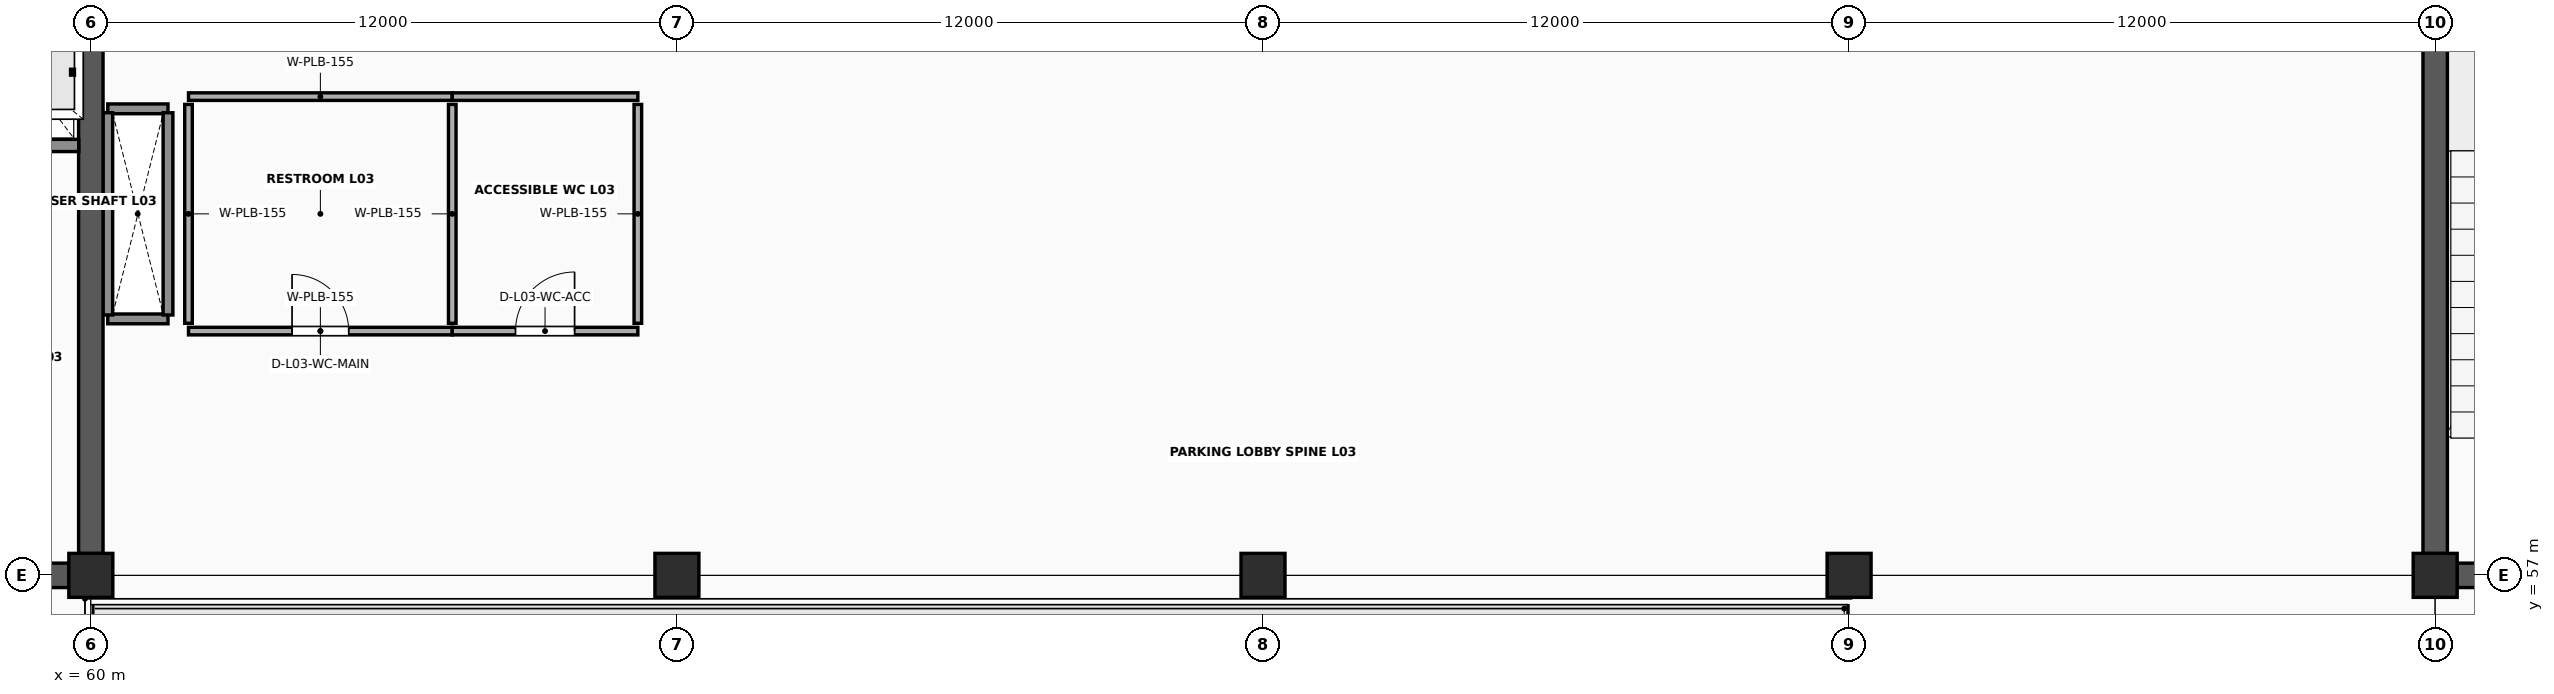
"""IFC4 building model, lengths in metres.
Left out: names, types, materials, properties, quantities, classifications, styles, units other than length and angle.
Written with IfcOpenShell. Run it as: python <this file> out.ifc"""

import sys

from ifc_helpers import new_model, si_unit, direction, frame, frame_2d, origin, origin_2d, place, context, subcontext, project, spatial, rectangle, extrude, element, fill, save


model = new_model("IFC4")
c1 = context("Model", 3, precision=1e-05, world=origin(), true_north=direction((0.0, 1.0)))
c2 = subcontext(c1, "Body", "Model", "MODEL_VIEW")
j1 = project(units=[si_unit("LENGTHUNIT", "METRE"), si_unit("PLANEANGLEUNIT", "RADIAN")], contexts=[c1])
p1 = place(None, origin())
s1 = spatial("IfcSite", under=j1, at=p1, CompositionType="ELEMENT")
p2 = place(p1, origin())
s2 = spatial("IfcBuilding", under=s1, at=p2, CompositionType="ELEMENT")
p3 = place(p2, frame((0.0, 0.0, 13.4)))
s3 = spatial("IfcBuildingStorey", under=s2, at=p3, CompositionType="ELEMENT", Elevation=13.4)
for number, where, z_axis, x_axis in (
    (1, (60.0, 57.0, 0.0), (0.0, 0.0, 1.0), (1.0, 0.0, 0.0)),
    (2, (72.0, 57.0, 0.0), (0.0, 0.0, 1.0), (1.0, 0.0, 0.0)),
    (3, (84.0, 57.0, 0.0), (0.0, 0.0, 1.0), (1.0, 0.0, 0.0)),
    (4, (96.0, 57.0, 0.0), (0.0, 0.0, 1.0), (1.0, 0.0, 0.0)),
    (5, (108.0, 57.0, 0.0), (0.0, 0.0, 1.0), (1.0, 0.0, 0.0)),
):
    element("IfcColumn", number, at=place(p3, frame(where, z_axis=z_axis, x_axis=x_axis)), inside=s3, PredefinedType="COLUMN", context=c2, shape_type="SweptSolid", body=[
        extrude(rectangle(XDim=0.9, YDim=0.9, at=origin_2d()), origin(), (0.0, 0.0, 1.0), 3.8),
    ])
for number, where, z_axis, x_axis in (
    (6, (60.347, 62.25, 0.0), (0.0, 0.0, 1.0), (1.0, 0.0, 0.0)),
    (7, (60.347, 66.55, 0.0), (0.0, 0.0, 1.0), (1.0, 0.0, 0.0)),
):
    element("IfcWall", number, at=place(p3, frame(where, z_axis=z_axis, x_axis=x_axis)), inside=s3, PredefinedType="SOLIDWALL", context=c2, shape_type="SweptSolid", body=[
        extrude(rectangle(XDim=1.233, YDim=0.2, at=frame_2d((0.617, 0.0))), origin(), (0.0, 0.0, 1.0), 3.618),
    ])
for number, where, z_axis, x_axis in (
    (8, (60.347, 62.33, 0.0), (0.0, 0.0, 1.0), (0.0, 1.0, 0.0)),
    (9, (61.58, 62.33, 0.0), (0.0, 0.0, 1.0), (0.0, 1.0, 0.0)),
):
    element("IfcWall", number, at=place(p3, frame(where, z_axis=z_axis, x_axis=x_axis)), inside=s3, PredefinedType="SOLIDWALL", context=c2, shape_type="SweptSolid", body=[
        extrude(rectangle(XDim=4.14, YDim=0.2, at=frame_2d((2.07, 0.0))), origin(), (0.0, 0.0, 1.0), 3.618),
    ])
p4 = place(p3, frame((48.447, 57.0, 0.0), z_axis=(0.0, 0.0, 1.0), x_axis=(1.0, 0.0, 0.0)))
e10 = element("IfcWall", 10, at=p4, inside=s3, PredefinedType="SHEAR", context=c2, shape_type="SweptSolid", body=[
    extrude(rectangle(XDim=11.106, YDim=0.5, at=frame_2d((5.553, 0.0))), origin(), (0.0, 0.0, 1.0), 3.618),
])
p5 = place(p4, frame((4.753, 0.0, 0.0)))
e11 = element("IfcOpeningElement", 11, at=p5, cuts=e10, PredefinedType="OPENING", context=c2, shape_type="SweptSolid", body=[
    extrude(rectangle(XDim=1.2, YDim=2.2, at=frame_2d((0.6, 1.1))), frame((0.0, 0.265, 0.0), z_axis=(0.0, -1.0, 0.0), x_axis=(1.0, 0.0, 0.0)), (0.0, 0.0, 1.0), 0.53),
])
p6 = place(p4, frame((8.453, 0.0, 0.0)))
e12 = element("IfcOpeningElement", 12, at=p6, cuts=e10, PredefinedType="OPENING", context=c2, shape_type="SweptSolid", body=[
    extrude(rectangle(XDim=1.5, YDim=2.25, at=frame_2d((0.75, 1.125))), frame((0.0, 0.265, 0.0), z_axis=(0.0, -1.0, 0.0), x_axis=(1.0, 0.0, 0.0)), (0.0, 0.0, 1.0), 0.53),
])
p7 = place(p3, frame((60.0, 57.447, 0.0), z_axis=(0.0, 0.0, 1.0), x_axis=(0.0, 1.0, 0.0)))
e13 = element("IfcWall", 13, at=p7, inside=s3, PredefinedType="SHEAR", context=c2, shape_type="SweptSolid", body=[
    extrude(rectangle(XDim=11.106, YDim=0.5, at=frame_2d((5.553, 0.0))), origin(), (0.0, 0.0, 1.0), 3.618),
])
p8 = place(p3, frame((52.597, 65.8, 0.0), z_axis=(0.0, 0.0, 1.0), x_axis=(1.0, 0.0, 0.0)))
e14 = element("IfcWall", 14, at=p8, inside=s3, PredefinedType="SOLIDWALL", context=c2, shape_type="SweptSolid", body=[
    extrude(rectangle(XDim=7.156, YDim=0.25, at=frame_2d((3.578, 0.0))), origin(), (0.0, 0.0, 1.0), 3.618),
])
p9 = place(p8, frame((0.653, 0.0, 0.0)))
e15 = element("IfcOpeningElement", 15, at=p9, cuts=e14, PredefinedType="OPENING", context=c2, shape_type="SweptSolid", body=[
    extrude(rectangle(XDim=1.1, YDim=2.24, at=frame_2d((0.55, 1.12))), frame((0.0, 0.14, 0.0), z_axis=(0.0, -1.0, 0.0), x_axis=(1.0, 0.0, 0.0)), (0.0, 0.0, 1.0), 0.28),
])
p10 = place(p8, frame((3.153, 0.0, 0.0)))
e16 = element("IfcOpeningElement", 16, at=p10, cuts=e14, PredefinedType="OPENING", context=c2, shape_type="SweptSolid", body=[
    extrude(rectangle(XDim=1.05, YDim=2.2, at=frame_2d((0.525, 1.1))), frame((0.0, 0.14, 0.0), z_axis=(0.0, -1.0, 0.0), x_axis=(1.0, 0.0, 0.0)), (0.0, 0.0, 1.0), 0.28),
])
p11 = place(p8, frame((5.528, 0.0, 0.0)))
e17 = element("IfcOpeningElement", 17, at=p11, cuts=e14, PredefinedType="OPENING", context=c2, shape_type="SweptSolid", body=[
    extrude(rectangle(XDim=1.05, YDim=2.2, at=frame_2d((0.525, 1.1))), frame((0.0, 0.14, 0.0), z_axis=(0.0, -1.0, 0.0), x_axis=(1.0, 0.0, 0.0)), (0.0, 0.0, 1.0), 0.28),
])
p12 = place(p3, frame((108.447, 57.0, 0.0), z_axis=(0.0, 0.0, 1.0), x_axis=(1.0, 0.0, 0.0)))
e18 = element("IfcWall", 18, at=p12, inside=s3, PredefinedType="SHEAR", context=c2, shape_type="SweptSolid", body=[
    extrude(rectangle(XDim=11.106, YDim=0.5, at=frame_2d((5.553, 0.0))), origin(), (0.0, 0.0, 1.0), 3.618),
])
p13 = place(p12, frame((4.753, 0.0, 0.0)))
e19 = element("IfcOpeningElement", 19, at=p13, cuts=e18, PredefinedType="OPENING", context=c2, shape_type="SweptSolid", body=[
    extrude(rectangle(XDim=1.2, YDim=2.2, at=frame_2d((0.6, 1.1))), frame((0.0, 0.265, 0.0), z_axis=(0.0, -1.0, 0.0), x_axis=(1.0, 0.0, 0.0)), (0.0, 0.0, 1.0), 0.53),
])
p14 = place(p12, frame((8.453, 0.0, 0.0)))
e20 = element("IfcOpeningElement", 20, at=p14, cuts=e18, PredefinedType="OPENING", context=c2, shape_type="SweptSolid", body=[
    extrude(rectangle(XDim=1.5, YDim=2.25, at=frame_2d((0.75, 1.125))), frame((0.0, 0.265, 0.0), z_axis=(0.0, -1.0, 0.0), x_axis=(1.0, 0.0, 0.0)), (0.0, 0.0, 1.0), 0.53),
])
p15 = place(p3, frame((108.0, 57.447, 0.0), z_axis=(0.0, 0.0, 1.0), x_axis=(0.0, 1.0, 0.0)))
e21 = element("IfcWall", 21, at=p15, inside=s3, PredefinedType="SHEAR", context=c2, shape_type="SweptSolid", body=[
    extrude(rectangle(XDim=11.106, YDim=0.5, at=frame_2d((5.553, 0.0))), origin(), (0.0, 0.0, 1.0), 3.618),
])
p16 = place(p3, frame((62.0, 62.0, 0.0), z_axis=(0.0, 0.0, 1.0), x_axis=(1.0, 0.0, 0.0)))
e22 = element("IfcWall", 22, at=p16, inside=s3, PredefinedType="PLUMBINGWALL", context=c2, shape_type="SweptSolid", body=[
    extrude(rectangle(XDim=5.4, YDim=0.155, at=frame_2d((2.7, 0.0))), origin(), (0.0, 0.0, 1.0), 2.75),
])
p17 = place(p16, frame((2.12, 0.0, 0.0)))
e23 = element("IfcOpeningElement", 23, at=p17, cuts=e22, PredefinedType="OPENING", context=c2, shape_type="SweptSolid", body=[
    extrude(rectangle(XDim=1.16, YDim=2.23, at=frame_2d((0.58, 1.115))), frame((0.0, 0.093, 0.0), z_axis=(0.0, -1.0, 0.0), x_axis=(1.0, 0.0, 0.0)), (0.0, 0.0, 1.0), 0.185),
])
p18 = place(p3, frame((62.0, 66.8, 0.0), z_axis=(0.0, 0.0, 1.0), x_axis=(1.0, 0.0, 0.0)))
e24 = element("IfcWall", 24, at=p18, inside=s3, PredefinedType="PLUMBINGWALL", context=c2, shape_type="SweptSolid", body=[
    extrude(rectangle(XDim=5.4, YDim=0.155, at=frame_2d((2.7, 0.0))), origin(), (0.0, 0.0, 1.0), 2.75),
])
for number, where, z_axis, x_axis in (
    (25, (62.0, 62.16, 0.0), (0.0, 0.0, 1.0), (0.0, 1.0, 0.0)),
    (26, (67.4, 62.16, 0.0), (0.0, 0.0, 1.0), (0.0, 1.0, 0.0)),
):
    element("IfcWall", number, at=place(p3, frame(where, z_axis=z_axis, x_axis=x_axis)), inside=s3, PredefinedType="PLUMBINGWALL", context=c2, shape_type="SweptSolid", body=[
        extrude(rectangle(XDim=4.48, YDim=0.155, at=frame_2d((2.24, 0.0))), origin(), (0.0, 0.0, 1.0), 2.75),
    ])
p19 = place(p3, frame((67.4, 62.0, 0.0), z_axis=(0.0, 0.0, 1.0), x_axis=(1.0, 0.0, 0.0)))
e27 = element("IfcWall", 27, at=p19, inside=s3, PredefinedType="PLUMBINGWALL", context=c2, shape_type="SweptSolid", body=[
    extrude(rectangle(XDim=3.8, YDim=0.155, at=frame_2d((1.9, 0.0))), origin(), (0.0, 0.0, 1.0), 2.75),
])
p20 = place(p19, frame((1.295, 0.0, 0.0)))
e28 = element("IfcOpeningElement", 28, at=p20, cuts=e27, PredefinedType="OPENING", context=c2, shape_type="SweptSolid", body=[
    extrude(rectangle(XDim=1.21, YDim=2.25, at=frame_2d((0.605, 1.125))), frame((0.0, 0.093, 0.0), z_axis=(0.0, -1.0, 0.0), x_axis=(1.0, 0.0, 0.0)), (0.0, 0.0, 1.0), 0.185),
])
p21 = place(p3, frame((67.4, 66.8, 0.0), z_axis=(0.0, 0.0, 1.0), x_axis=(1.0, 0.0, 0.0)))
e29 = element("IfcWall", 29, at=p21, inside=s3, PredefinedType="PLUMBINGWALL", context=c2, shape_type="SweptSolid", body=[
    extrude(rectangle(XDim=3.8, YDim=0.155, at=frame_2d((1.9, 0.0))), origin(), (0.0, 0.0, 1.0), 2.75),
])
p22 = place(p3, frame((71.2, 62.16, 0.0), z_axis=(0.0, 0.0, 1.0), x_axis=(0.0, 1.0, 0.0)))
e30 = element("IfcWall", 30, at=p22, inside=s3, PredefinedType="PLUMBINGWALL", context=c2, shape_type="SweptSolid", body=[
    extrude(rectangle(XDim=4.48, YDim=0.155, at=frame_2d((2.24, 0.0))), origin(), (0.0, 0.0, 1.0), 2.75),
])
p23 = place(p17, origin())
e31 = element("IfcDoor", 31, at=p23, inside=s3, OperationType="SINGLE_SWING_LEFT", PredefinedType="DOOR", context=c2, shape_type="SweptSolid", body=[
    extrude(rectangle(XDim=1.16, YDim=2.23, at=frame_2d((0.58, 1.115))), frame((0.0, 0.025, 0.0), z_axis=(0.0, -1.0, 0.0), x_axis=(1.0, 0.0, 0.0)), (0.0, 0.0, 1.0), 0.05),
])
fill(e23, e31)
p24 = place(p20, origin())
e32 = element("IfcDoor", 32, at=p24, inside=s3, OperationType="SINGLE_SWING_RIGHT", PredefinedType="DOOR", context=c2, shape_type="SweptSolid", body=[
    extrude(rectangle(XDim=1.21, YDim=2.25, at=frame_2d((0.605, 1.125))), frame((0.0, 0.025, 0.0), z_axis=(0.0, -1.0, 0.0), x_axis=(1.0, 0.0, 0.0)), (0.0, 0.0, 1.0), 0.05),
])
fill(e28, e32)
save(model, sys.argv[1])
